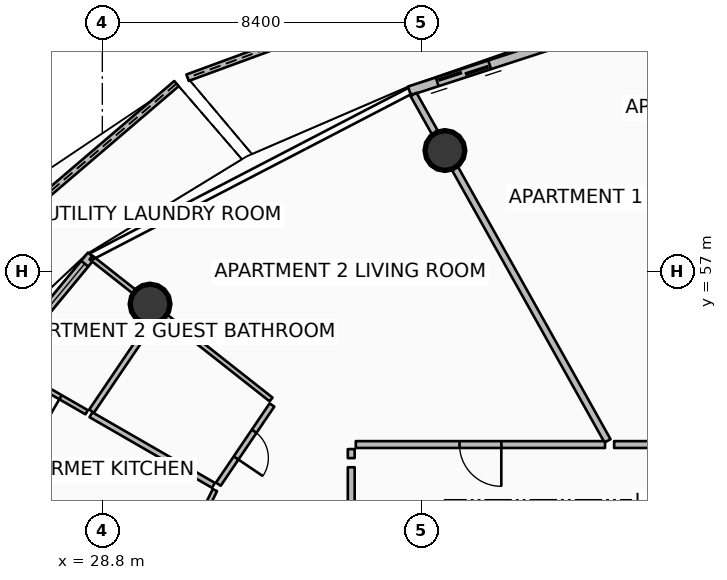
"""IFC4 building model, lengths in metres.
Left out: names, types, materials, properties, quantities, classifications, styles, units other than length and angle.
Written with IfcOpenShell. Run it as: python <this file> out.ifc"""

import sys

from ifc_helpers import new_model, si_unit, direction, frame, frame_2d, origin, origin_2d, place, context, subcontext, project, spatial, polyline, rectangle, circle, outline, extrude, element, fill, save


model = new_model("IFC4")
c1 = context("Model", 3, precision=1e-05, world=origin(), true_north=direction((0.0, 1.0)))
c2 = subcontext(c1, "Body", "Model", "MODEL_VIEW")
j1 = project(units=[si_unit("LENGTHUNIT", "METRE"), si_unit("PLANEANGLEUNIT", "RADIAN")], contexts=[c1])
p1 = place(None, origin())
s1 = spatial("IfcSite", under=j1, at=p1, CompositionType="ELEMENT")
p2 = place(p1, origin())
s2 = spatial("IfcBuilding", under=s1, at=p2, CompositionType="ELEMENT")
p3 = place(p2, frame((0.0, 0.0, 176.55)))
s3 = spatial("IfcBuildingStorey", under=s2, at=p3, CompositionType="ELEMENT", Elevation=176.55)
for number, where, z_axis, x_axis in (
    (1, (37.815, 60.186, 0.0), (0.0, 0.0, 1.0), (1.0, 0.0, 0.0)),
    (2, (30.056, 56.146, 0.0), (0.0, 0.0, 1.0), (1.0, 0.0, 0.0)),
):
    element("IfcColumn", number, at=place(p3, frame(where, z_axis=z_axis, x_axis=x_axis)), inside=s3, PredefinedType="COLUMN", context=c2, shape_type="SweptSolid", body=[
        extrude(circle(Radius=0.525, at=origin_2d()), origin(), (0.0, 0.0, 1.0), 3.5),
    ])
p4 = place(p3, frame((40.244, 65.482, 0.0), z_axis=(0.0, 0.0, 1.0), x_axis=(-0.938669265972, -0.344818806214, 0.0)))
e3 = element("IfcWall", 3, at=p4, inside=s3, PredefinedType="PARAPET", context=c2, shape_type="SweptSolid", body=[
    extrude(outline(polyline([(0.0, 0.0), (9.803, 0.0), (9.802, 1.86), (4.901, 1.798), (0.0, 1.632), (0.0, 0.0)])), frame((0.0, 0.09, 0.0), z_axis=(0.0, -1.0, 0.0), x_axis=(1.0, 0.0, 0.0)), (0.0, 0.0, 1.0), 0.18),
])
p5 = place(p3, frame((30.752, 61.947, 0.0), z_axis=(0.0, 0.0, 1.0), x_axis=(-0.760227532438, -0.649656908624, 0.0)))
e4 = element("IfcWall", 4, at=p5, inside=s3, PredefinedType="PARAPET", context=c2, shape_type="SweptSolid", body=[
    extrude(outline(polyline([(0.0, 0.0), (10.64, 0.0), (10.64, 1.632), (5.32, 1.798), (0.0, 1.86), (0.0, 0.0)])), frame((0.0, 0.09, 0.0), z_axis=(0.0, -1.0, 0.0), x_axis=(1.0, 0.0, 0.0)), (0.0, 0.0, 1.0), 0.18),
])
p6 = place(p3, frame((45.384, 64.519, 0.0), z_axis=(0.0, 0.0, 1.0), x_axis=(-0.951058543936, -0.309010753869, 0.0)))
e5 = element("IfcWall", 5, at=p6, inside=s3, PredefinedType="SOLIDWALL", context=c2, shape_type="SweptSolid", body=[
    extrude(rectangle(XDim=8.942, YDim=0.24, at=frame_2d((4.471, 0.0))), origin(), (0.0, 0.0, 1.0), 2.45),
])
p7 = place(p6, frame((6.722, 0.0, 0.0)))
e6 = element("IfcOpeningElement", 6, at=p7, cuts=e5, PredefinedType="OPENING", context=c2, shape_type="SweptSolid", body=[
    extrude(rectangle(XDim=1.45, YDim=2.15, at=frame_2d((0.725, 1.075))), frame((0.0, 0.13, 0.0), z_axis=(0.0, -1.0, 0.0), x_axis=(1.0, 0.0, 0.0)), (0.0, 0.0, 1.0), 0.26),
])
p8 = place(p6, frame((0.28, 0.0, 0.65)))
e7 = element("IfcOpeningElement", 7, at=p8, cuts=e5, PredefinedType="OPENING", context=c2, shape_type="SweptSolid", body=[
    extrude(rectangle(XDim=1.6, YDim=1.5, at=frame_2d((0.8, 0.75))), frame((0.0, 0.13, 0.0), z_axis=(0.0, -1.0, 0.0), x_axis=(1.0, 0.0, 0.0)), (0.0, 0.0, 1.0), 0.26),
])
p9 = place(p3, frame((28.515, 57.424, 0.0), z_axis=(0.0, 0.0, 1.0), x_axis=(-0.636759394418, -0.771062561418, 0.0)))
e8 = element("IfcWall", 8, at=p9, inside=s3, PredefinedType="SOLIDWALL", context=c2, shape_type="SweptSolid", body=[
    extrude(rectangle(XDim=10.494, YDim=0.24, at=frame_2d((5.247, 0.0))), origin(), (0.0, 0.0, 1.0), 2.45),
])
p10 = place(p9, frame((8.274, 0.0, 0.0)))
e9 = element("IfcOpeningElement", 9, at=p10, cuts=e8, PredefinedType="OPENING", context=c2, shape_type="SweptSolid", body=[
    extrude(rectangle(XDim=1.45, YDim=2.15, at=frame_2d((0.725, 1.075))), frame((0.0, 0.13, 0.0), z_axis=(0.0, -1.0, 0.0), x_axis=(1.0, 0.0, 0.0)), (0.0, 0.0, 1.0), 0.26),
])
p11 = place(p9, frame((0.28, 0.0, 0.65)))
e10 = element("IfcOpeningElement", 10, at=p11, cuts=e8, PredefinedType="OPENING", context=c2, shape_type="SweptSolid", body=[
    extrude(rectangle(XDim=1.6, YDim=1.5, at=frame_2d((0.8, 0.75))), frame((0.0, 0.13, 0.0), z_axis=(0.0, -1.0, 0.0), x_axis=(1.0, 0.0, 0.0)), (0.0, 0.0, 1.0), 0.26),
])
p12 = place(p3, frame((42.094, 52.546, 0.0), z_axis=(0.0, 0.0, 1.0), x_axis=(-0.488614041717, 0.872500039104, 0.0)))
e11 = element("IfcWall", 11, at=p12, inside=s3, PredefinedType="PARTITIONING", context=c2, shape_type="SweptSolid", body=[
    extrude(rectangle(XDim=10.448, YDim=0.18, at=frame_2d((5.224, 0.0))), origin(), (0.0, 0.0, 1.0), 2.94),
])
p13 = place(p3, frame((46.643, 52.45, 0.0), z_axis=(0.0, 0.0, 1.0), x_axis=(-1.0, 0.0, 0.0)))
e12 = element("IfcWall", 12, at=p13, inside=s3, PredefinedType="PARTITIONING", context=c2, shape_type="SweptSolid", body=[
    extrude(rectangle(XDim=4.376, YDim=0.18, at=frame_2d((2.188, 0.0))), origin(), (0.0, 0.0, 1.0), 2.94),
])
p14 = place(p13, frame((1.638, 0.0, 0.0)))
e13 = element("IfcOpeningElement", 13, at=p14, cuts=e12, PredefinedType="OPENING", context=c2, shape_type="SweptSolid", body=[
    extrude(rectangle(XDim=1.1, YDim=2.1, at=frame_2d((0.55, 1.05))), frame((0.0, 0.1, 0.0), z_axis=(0.0, -1.0, 0.0), x_axis=(1.0, 0.0, 0.0)), (0.0, 0.0, 1.0), 0.2),
])
p15 = place(p3, frame((42.028, 52.45, 0.0), z_axis=(0.0, 0.0, 1.0), x_axis=(-1.0, 0.0, 0.0)))
e14 = element("IfcWall", 14, at=p15, inside=s3, PredefinedType="PARTITIONING", context=c2, shape_type="SweptSolid", body=[
    extrude(rectangle(XDim=6.558, YDim=0.18, at=frame_2d((3.279, 0.0))), origin(), (0.0, 0.0, 1.0), 2.94),
])
p16 = place(p15, frame((2.729, 0.0, 0.0)))
e15 = element("IfcOpeningElement", 15, at=p16, cuts=e14, PredefinedType="OPENING", context=c2, shape_type="SweptSolid", body=[
    extrude(rectangle(XDim=1.1, YDim=2.1, at=frame_2d((0.55, 1.05))), frame((0.0, 0.1, 0.0), z_axis=(0.0, -1.0, 0.0), x_axis=(1.0, 0.0, 0.0)), (0.0, 0.0, 1.0), 0.2),
])
p17 = place(p3, frame((35.35, 52.33, 0.0), z_axis=(0.0, 0.0, 1.0), x_axis=(0.0, -1.0, 0.0)))
e16 = element("IfcWall", 16, at=p17, inside=s3, PredefinedType="PARTITIONING", context=c2, shape_type="SweptSolid", body=[
    extrude(rectangle(XDim=0.238, YDim=0.18, at=frame_2d((0.119, 0.0))), origin(), (0.0, 0.0, 1.0), 2.94),
])
p18 = place(p3, frame((35.35, 51.853, 0.0), z_axis=(0.0, 0.0, 1.0), x_axis=(0.0, -1.0, 0.0)))
e17 = element("IfcWall", 17, at=p18, inside=s3, PredefinedType="PARTITIONING", context=c2, shape_type="SweptSolid", body=[
    extrude(rectangle(XDim=6.165, YDim=0.18, at=frame_2d((3.083, 0.0))), origin(), (0.0, 0.0, 1.0), 2.94),
])
p19 = place(p3, frame((33.241, 53.635, 0.0), z_axis=(0.0, 0.0, 1.0), x_axis=(-0.785321754625, 0.619087830371, 0.0)))
e18 = element("IfcWall", 18, at=p19, inside=s3, PredefinedType="PARTITIONING", context=c2, shape_type="SweptSolid", body=[
    extrude(rectangle(XDim=6.033, YDim=0.125, at=frame_2d((3.017, 0.0))), origin(), (0.0, 0.0, 1.0), 2.94),
])
p20 = place(p3, frame((33.263, 53.49, 0.0), z_axis=(0.0, 0.0, 1.0), x_axis=(-0.560597119889, -0.828088684364, 0.0)))
e19 = element("IfcWall", 19, at=p20, inside=s3, PredefinedType="PARTITIONING", context=c2, shape_type="SweptSolid", body=[
    extrude(rectangle(XDim=2.516, YDim=0.15, at=frame_2d((1.258, 0.0))), origin(), (0.0, 0.0, 1.0), 2.94),
])
p21 = place(p20, frame((0.833, 0.0, 0.0)))
e20 = element("IfcOpeningElement", 20, at=p21, cuts=e19, PredefinedType="OPENING", context=c2, shape_type="SweptSolid", body=[
    extrude(rectangle(XDim=0.85, YDim=2.06, at=frame_2d((0.425, 1.03))), frame((0.0, 0.085, 0.0), z_axis=(0.0, -1.0, 0.0), x_axis=(1.0, 0.0, 0.0)), (0.0, 0.0, 1.0), 0.17),
])
p22 = place(p3, frame((30.24, 55.874, 0.0), z_axis=(0.0, 0.0, 1.0), x_axis=(-0.560588198731, -0.828094723714, 0.0)))
e21 = element("IfcWall", 21, at=p22, inside=s3, PredefinedType="PARTITIONING", context=c2, shape_type="SweptSolid", body=[
    extrude(rectangle(XDim=3.074, YDim=0.15, at=frame_2d((1.537, 0.0))), origin(), (0.0, 0.0, 1.0), 2.94),
])
p23 = place(p3, frame((31.724, 51.377, 0.0), z_axis=(0.0, 0.0, 1.0), x_axis=(-0.866501175841, 0.499175031693, 0.0)))
e22 = element("IfcWall", 22, at=p23, inside=s3, PredefinedType="PARTITIONING", context=c2, shape_type="SweptSolid", body=[
    extrude(rectangle(XDim=3.72, YDim=0.15, at=frame_2d((1.86, 0.0))), origin(), (0.0, 0.0, 1.0), 2.94),
])
p24 = place(p3, frame((28.388, 53.299, 0.0), z_axis=(0.0, 0.0, 1.0), x_axis=(-0.866470316497, 0.499228595565, 0.0)))
e23 = element("IfcWall", 23, at=p24, inside=s3, PredefinedType="PARTITIONING", context=c2, shape_type="SweptSolid", body=[
    extrude(rectangle(XDim=2.44, YDim=0.125, at=frame_2d((1.22, 0.0))), origin(), (0.0, 0.0, 1.0), 2.94),
])
p25 = place(p24, frame((0.795, 0.0, 0.0)))
e24 = element("IfcOpeningElement", 24, at=p25, cuts=e23, PredefinedType="OPENING", context=c2, shape_type="SweptSolid", body=[
    extrude(rectangle(XDim=0.85, YDim=2.06, at=frame_2d((0.425, 1.03))), frame((0.0, 0.073, 0.0), z_axis=(0.0, -1.0, 0.0), x_axis=(1.0, 0.0, 0.0)), (0.0, 0.0, 1.0), 0.145),
])
p26 = place(p3, frame((30.627, 49.143, 0.0), z_axis=(0.0, 0.0, 1.0), x_axis=(-0.92485745631, 0.380313930205, 0.0)))
e25 = element("IfcWall", 25, at=p26, inside=s3, PredefinedType="PARTITIONING", context=c2, shape_type="SweptSolid", body=[
    extrude(rectangle(XDim=7.1, YDim=0.125, at=frame_2d((3.55, 0.0))), origin(), (0.0, 0.0, 1.0), 2.94),
])
p27 = place(p3, frame((31.762, 51.251, 0.0), z_axis=(0.0, 0.0, 1.0), x_axis=(-0.440639073568, -0.897684358138, 0.0)))
e26 = element("IfcWall", 26, at=p27, inside=s3, PredefinedType="PARTITIONING", context=c2, shape_type="SweptSolid", body=[
    extrude(rectangle(XDim=2.307, YDim=0.125, at=frame_2d((1.153, 0.0))), origin(), (0.0, 0.0, 1.0), 2.94),
])
p28 = place(p27, frame((0.728, 0.0, 0.0)))
e27 = element("IfcOpeningElement", 27, at=p28, cuts=e26, PredefinedType="OPENING", context=c2, shape_type="SweptSolid", body=[
    extrude(rectangle(XDim=0.85, YDim=2.06, at=frame_2d((0.425, 1.03))), frame((0.0, 0.073, 0.0), z_axis=(0.0, -1.0, 0.0), x_axis=(1.0, 0.0, 0.0)), (0.0, 0.0, 1.0), 0.145),
])
p29 = place(p7, origin())
e28 = element("IfcDoor", 28, at=p29, inside=s3, OperationType="DOUBLE_DOOR_SLIDING", PredefinedType="DOOR", context=c2, shape_type="SweptSolid", body=[
    extrude(rectangle(XDim=1.45, YDim=2.15, at=frame_2d((0.725, 1.075))), frame((0.0, 0.025, 0.0), z_axis=(0.0, -1.0, 0.0), x_axis=(1.0, 0.0, 0.0)), (0.0, 0.0, 1.0), 0.05),
])
fill(e6, e28)
p30 = place(p11, origin())
e29 = element("IfcWindow", 29, at=p30, inside=s3, PartitioningType="SINGLE_PANEL", PredefinedType="WINDOW", context=c2, shape_type="SweptSolid", body=[
    extrude(rectangle(XDim=1.6, YDim=1.5, at=frame_2d((0.8, 0.75))), frame((0.0, 0.03, 0.0), z_axis=(0.0, -1.0, 0.0), x_axis=(1.0, 0.0, 0.0)), (0.0, 0.0, 1.0), 0.06),
])
fill(e10, e29)
p31 = place(p16, origin())
e30 = element("IfcDoor", 30, at=p31, inside=s3, OperationType="SINGLE_SWING_LEFT", PredefinedType="DOOR", context=c2, shape_type="SweptSolid", body=[
    extrude(rectangle(XDim=1.1, YDim=2.1, at=frame_2d((0.55, 1.05))), frame((0.0, 0.025, 0.0), z_axis=(0.0, -1.0, 0.0), x_axis=(1.0, 0.0, 0.0)), (0.0, 0.0, 1.0), 0.05),
])
fill(e15, e30)
p32 = place(p21, origin())
e31 = element("IfcDoor", 31, at=p32, inside=s3, OperationType="SINGLE_SWING_RIGHT", PredefinedType="DOOR", context=c2, shape_type="SweptSolid", body=[
    extrude(rectangle(XDim=0.85, YDim=2.06, at=frame_2d((0.425, 1.03))), frame((0.0, 0.025, 0.0), z_axis=(0.0, -1.0, 0.0), x_axis=(1.0, 0.0, 0.0)), (0.0, 0.0, 1.0), 0.05),
])
fill(e20, e31)
p33 = place(p25, origin())
e32 = element("IfcDoor", 32, at=p33, inside=s3, OperationType="SINGLE_SWING_LEFT", PredefinedType="DOOR", context=c2, shape_type="SweptSolid", body=[
    extrude(rectangle(XDim=0.85, YDim=2.06, at=frame_2d((0.425, 1.03))), frame((0.0, 0.025, 0.0), z_axis=(0.0, -1.0, 0.0), x_axis=(1.0, 0.0, 0.0)), (0.0, 0.0, 1.0), 0.05),
])
fill(e24, e32)
save(model, sys.argv[1])
